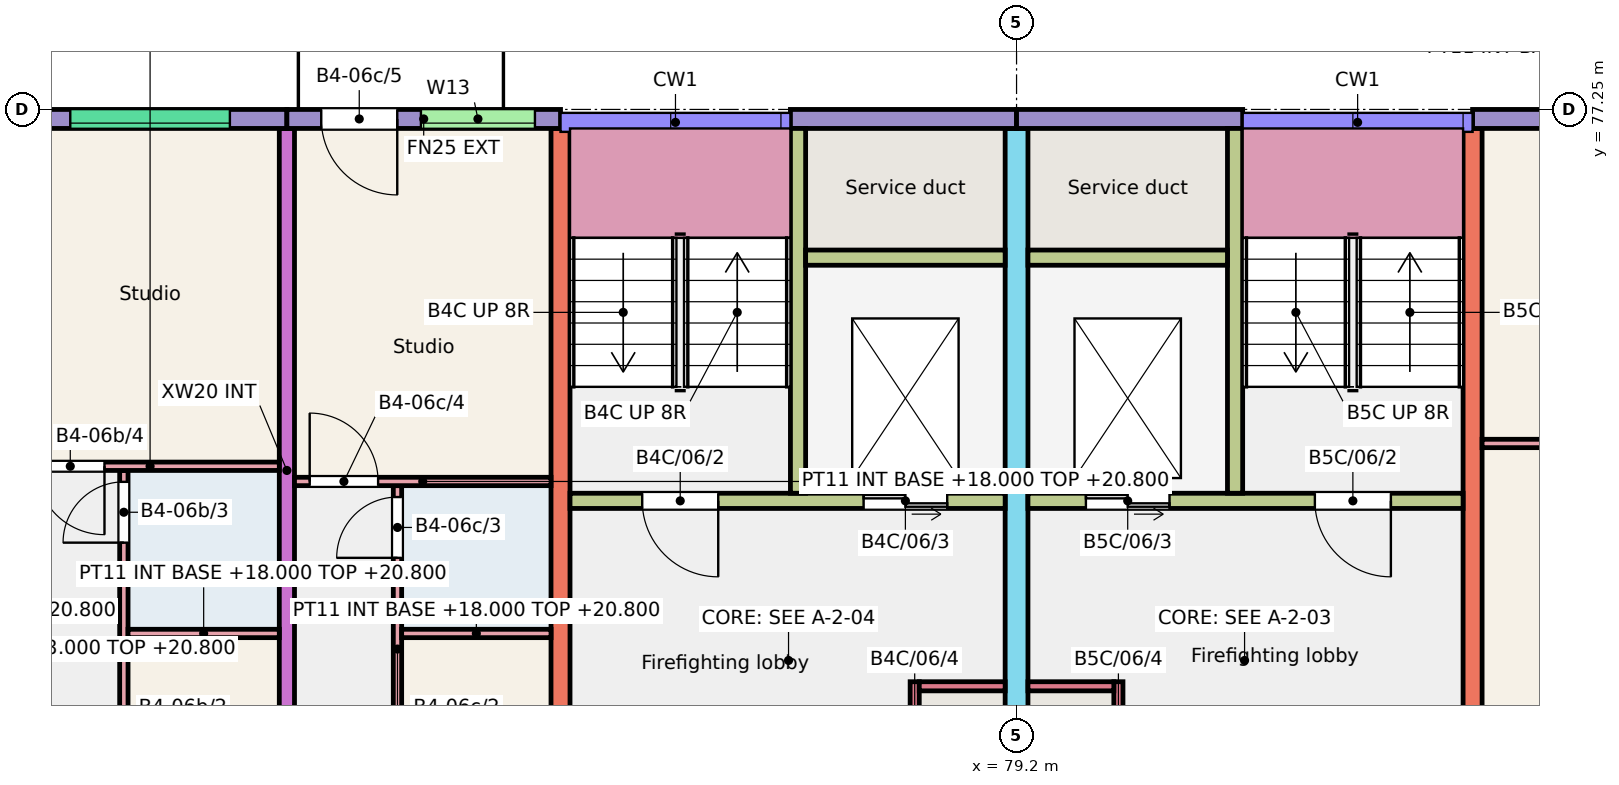
"""IFC4 building model, lengths in metres.
Left out: names, types, materials, properties, quantities, classifications, styles, units other than length and angle.
Written with IfcOpenShell. Run it as: python <this file> out.ifc"""

import sys

from ifc_helpers import new_model, si_unit, direction, frame, frame_2d, origin, place, context, subcontext, project, spatial, rectangle, extrude, element, fill, save


model = new_model("IFC4")
c1 = context("Model", 3, precision=1e-05, world=origin(), true_north=direction((0.0, 1.0)))
c2 = subcontext(c1, "Body", "Model", "MODEL_VIEW")
j1 = project(units=[si_unit("LENGTHUNIT", "METRE"), si_unit("PLANEANGLEUNIT", "RADIAN")], contexts=[c1])
p1 = place(None, origin())
s1 = spatial("IfcSite", under=j1, at=p1, CompositionType="ELEMENT")
p2 = place(p1, origin())
s2 = spatial("IfcBuilding", under=s1, at=p2, CompositionType="ELEMENT")
p3 = place(p2, frame((0.0, 0.0, 18.0)))
s3 = spatial("IfcBuildingStorey", under=s2, at=p3, CompositionType="ELEMENT", Elevation=18.0)
p4 = place(p3, frame((69.6, 68.0, 0.0), z_axis=(0.0, 0.0, 1.0), x_axis=(0.0, 1.0, 0.0)))
e1 = element("IfcWall", 1, at=p4, inside=s3, PredefinedType="SHEAR", context=c2, shape_type="SweptSolid", body=[
    extrude(rectangle(XDim=9.0, YDim=0.2, at=frame_2d((4.5, 0.0))), origin(), (0.0, 0.0, 1.0), 3.0),
])
p5 = place(p3, frame((73.2, 68.0, 0.0), z_axis=(0.0, 0.0, 1.0), x_axis=(0.0, 1.0, 0.0)))
e2 = element("IfcWall", 2, at=p5, inside=s3, PredefinedType="SHEAR", context=c2, shape_type="SweptSolid", body=[
    extrude(rectangle(XDim=9.0, YDim=0.25, at=frame_2d((4.5, 0.0))), origin(), (0.0, 0.0, 1.0), 3.0),
])
p6 = place(p3, frame((79.2, 66.0, 0.0), z_axis=(0.0, 0.0, 1.0), x_axis=(0.0, 1.0, 0.0)))
e3 = element("IfcWall", 3, at=p6, inside=s3, PredefinedType="SHEAR", context=c2, shape_type="SweptSolid", body=[
    extrude(rectangle(XDim=11.0, YDim=0.3, at=frame_2d((5.5, 0.0))), origin(), (0.0, 0.0, 1.0), 3.0),
])
p7 = place(p6, frame((0.3, 0.0, 0.0)))
e4 = element("IfcOpeningElement", 4, at=p7, cuts=e3, PredefinedType="OPENING", context=c2, shape_type="SweptSolid", body=[
    extrude(rectangle(XDim=1.2, YDim=2.1, at=frame_2d((0.6, 1.05))), frame((0.0, 0.16, 0.0), z_axis=(0.0, -1.0, 0.0), x_axis=(1.0, 0.0, 0.0)), (0.0, 0.0, 1.0), 0.32),
])
p8 = place(p3, frame((85.2, 68.0, 0.0), z_axis=(0.0, 0.0, 1.0), x_axis=(0.0, 1.0, 0.0)))
e5 = element("IfcWall", 5, at=p8, inside=s3, PredefinedType="SHEAR", context=c2, shape_type="SweptSolid", body=[
    extrude(rectangle(XDim=9.0, YDim=0.25, at=frame_2d((4.5, 0.0))), origin(), (0.0, 0.0, 1.0), 3.0),
])
p9 = place(p3, frame((66.0, 77.125, 0.0), z_axis=(0.0, 0.0, 1.0), x_axis=(1.0, 0.0, 0.0)))
e6 = element("IfcWall", 6, at=p9, inside=s3, PredefinedType="SOLIDWALL", context=c2, shape_type="SweptSolid", body=[
    extrude(rectangle(XDim=3.6, YDim=0.25, at=frame_2d((1.8, 0.0))), origin(), (0.0, 0.0, 1.0), 3.0),
])
p10 = place(p9, frame((0.75, 0.0, 1.2)))
e7 = element("IfcOpeningElement", 7, at=p10, cuts=e6, PredefinedType="OPENING", context=c2, shape_type="SweptSolid", body=[
    extrude(rectangle(XDim=2.1, YDim=1.2, at=frame_2d((1.05, 0.6))), frame((0.0, 0.135, 0.0), z_axis=(0.0, -1.0, 0.0), x_axis=(1.0, 0.0, 0.0)), (0.0, 0.0, 1.0), 0.27),
])
p11 = place(p3, frame((69.6, 77.125, 0.0), z_axis=(0.0, 0.0, 1.0), x_axis=(1.0, 0.0, 0.0)))
e8 = element("IfcWall", 8, at=p11, inside=s3, PredefinedType="SOLIDWALL", context=c2, shape_type="SweptSolid", body=[
    extrude(rectangle(XDim=3.6, YDim=0.25, at=frame_2d((1.8, 0.0))), origin(), (0.0, 0.0, 1.0), 3.0),
])
p12 = place(p11, frame((1.763, 0.0, 1.2)))
e9 = element("IfcOpeningElement", 9, at=p12, cuts=e8, PredefinedType="OPENING", context=c2, shape_type="SweptSolid", body=[
    extrude(rectangle(XDim=1.5, YDim=1.2, at=frame_2d((0.75, 0.6))), frame((0.0, 0.135, 0.0), z_axis=(0.0, -1.0, 0.0), x_axis=(1.0, 0.0, 0.0)), (0.0, 0.0, 1.0), 0.27),
])
p13 = place(p11, frame((0.452, 0.0, 0.0)))
e10 = element("IfcOpeningElement", 10, at=p13, cuts=e8, PredefinedType="OPENING", context=c2, shape_type="SweptSolid", body=[
    extrude(rectangle(XDim=1.0, YDim=2.1, at=frame_2d((0.5, 1.05))), frame((0.0, 0.135, 0.0), z_axis=(0.0, -1.0, 0.0), x_axis=(1.0, 0.0, 0.0)), (0.0, 0.0, 1.0), 0.27),
])
p14 = place(p3, frame((76.225, 77.125, 0.0), z_axis=(0.0, 0.0, 1.0), x_axis=(1.0, 0.0, 0.0)))
e11 = element("IfcWall", 11, at=p14, inside=s3, PredefinedType="SOLIDWALL", context=c2, shape_type="SweptSolid", body=[
    extrude(rectangle(XDim=2.975, YDim=0.25, at=frame_2d((1.487, 0.0))), origin(), (0.0, 0.0, 1.0), 3.0),
])
p15 = place(p3, frame((73.325, 72.1, 0.0), z_axis=(0.0, 0.0, 1.0), x_axis=(1.0, 0.0, 0.0)))
e12 = element("IfcWall", 12, at=p15, inside=s3, PredefinedType="SHEAR", context=c2, shape_type="SweptSolid", body=[
    extrude(rectangle(XDim=5.725, YDim=0.2, at=frame_2d((2.863, 0.0))), origin(), (0.0, 0.0, 1.0), 3.0),
])
p16 = place(p15, frame((0.95, 0.0, 0.0)))
e13 = element("IfcOpeningElement", 13, at=p16, cuts=e12, PredefinedType="OPENING", context=c2, shape_type="SweptSolid", body=[
    extrude(rectangle(XDim=1.0, YDim=2.1, at=frame_2d((0.5, 1.05))), frame((0.0, 0.11, 0.0), z_axis=(0.0, -1.0, 0.0), x_axis=(1.0, 0.0, 0.0)), (0.0, 0.0, 1.0), 0.22),
])
p17 = place(p15, frame((3.863, 0.0, 0.0)))
e14 = element("IfcOpeningElement", 14, at=p17, cuts=e12, PredefinedType="OPENING", context=c2, shape_type="SweptSolid", body=[
    extrude(rectangle(XDim=1.1, YDim=2.1, at=frame_2d((0.55, 1.05))), frame((0.0, 0.11, 0.0), z_axis=(0.0, -1.0, 0.0), x_axis=(1.0, 0.0, 0.0)), (0.0, 0.0, 1.0), 0.22),
])
p18 = place(p3, frame((76.325, 72.2, 0.0), z_axis=(0.0, 0.0, 1.0), x_axis=(0.0, 1.0, 0.0)))
e15 = element("IfcWall", 15, at=p18, inside=s3, PredefinedType="SHEAR", context=c2, shape_type="SweptSolid", body=[
    extrude(rectangle(XDim=4.8, YDim=0.2, at=frame_2d((2.4, 0.0))), origin(), (0.0, 0.0, 1.0), 3.0),
])
p19 = place(p3, frame((76.425, 75.3, 0.0), z_axis=(0.0, 0.0, 1.0), x_axis=(1.0, 0.0, 0.0)))
e16 = element("IfcWall", 16, at=p19, inside=s3, PredefinedType="SHEAR", context=c2, shape_type="SweptSolid", body=[
    extrude(rectangle(XDim=2.625, YDim=0.2, at=frame_2d((1.312, 0.0))), origin(), (0.0, 0.0, 1.0), 3.0),
])
p20 = place(p3, frame((77.86, 68.0, 0.0), z_axis=(0.0, 0.0, 1.0), x_axis=(0.0, 1.0, 0.0)))
e17 = element("IfcWall", 17, at=p20, inside=s3, PredefinedType="SHEAR", context=c2, shape_type="SweptSolid", body=[
    extrude(rectangle(XDim=1.72, YDim=0.12, at=frame_2d((0.86, 0.0))), origin(), (0.0, 0.0, 1.0), 3.0),
])
p21 = place(p20, frame((0.45, 0.0, 0.0)))
e18 = element("IfcOpeningElement", 18, at=p21, cuts=e17, PredefinedType="OPENING", context=c2, shape_type="SweptSolid", body=[
    extrude(rectangle(XDim=0.9, YDim=2.1, at=frame_2d((0.45, 1.05))), frame((0.0, 0.07, 0.0), z_axis=(0.0, -1.0, 0.0), x_axis=(1.0, 0.0, 0.0)), (0.0, 0.0, 1.0), 0.14),
])
p22 = place(p3, frame((77.92, 69.66, 0.0), z_axis=(0.0, 0.0, 1.0), x_axis=(1.0, 0.0, 0.0)))
e19 = element("IfcWall", 19, at=p22, inside=s3, PredefinedType="SHEAR", context=c2, shape_type="SweptSolid", body=[
    extrude(rectangle(XDim=1.13, YDim=0.12, at=frame_2d((0.565, 0.0))), origin(), (0.0, 0.0, 1.0), 3.0),
])
p23 = place(p3, frame((79.2, 77.125, 0.0), z_axis=(0.0, 0.0, 1.0), x_axis=(1.0, 0.0, 0.0)))
e20 = element("IfcWall", 20, at=p23, inside=s3, PredefinedType="SOLIDWALL", context=c2, shape_type="SweptSolid", body=[
    extrude(rectangle(XDim=2.975, YDim=0.25, at=frame_2d((1.488, 0.0))), origin(), (0.0, 0.0, 1.0), 3.0),
])
p24 = place(p3, frame((79.35, 72.1, 0.0), z_axis=(0.0, 0.0, 1.0), x_axis=(1.0, 0.0, 0.0)))
e21 = element("IfcWall", 21, at=p24, inside=s3, PredefinedType="SHEAR", context=c2, shape_type="SweptSolid", body=[
    extrude(rectangle(XDim=5.725, YDim=0.2, at=frame_2d((2.862, 0.0))), origin(), (0.0, 0.0, 1.0), 3.0),
])
p25 = place(p24, frame((3.775, 0.0, 0.0)))
e22 = element("IfcOpeningElement", 22, at=p25, cuts=e21, PredefinedType="OPENING", context=c2, shape_type="SweptSolid", body=[
    extrude(rectangle(XDim=1.0, YDim=2.1, at=frame_2d((0.5, 1.05))), frame((0.0, 0.11, 0.0), z_axis=(0.0, -1.0, 0.0), x_axis=(1.0, 0.0, 0.0)), (0.0, 0.0, 1.0), 0.22),
])
p26 = place(p24, frame((0.762, 0.0, 0.0)))
e23 = element("IfcOpeningElement", 23, at=p26, cuts=e21, PredefinedType="OPENING", context=c2, shape_type="SweptSolid", body=[
    extrude(rectangle(XDim=1.1, YDim=2.1, at=frame_2d((0.55, 1.05))), frame((0.0, 0.11, 0.0), z_axis=(0.0, -1.0, 0.0), x_axis=(1.0, 0.0, 0.0)), (0.0, 0.0, 1.0), 0.22),
])
p27 = place(p3, frame((82.075, 72.2, 0.0), z_axis=(0.0, 0.0, 1.0), x_axis=(0.0, 1.0, 0.0)))
e24 = element("IfcWall", 24, at=p27, inside=s3, PredefinedType="SHEAR", context=c2, shape_type="SweptSolid", body=[
    extrude(rectangle(XDim=4.8, YDim=0.2, at=frame_2d((2.4, 0.0))), origin(), (0.0, 0.0, 1.0), 3.0),
])
p28 = place(p3, frame((79.35, 75.3, 0.0), z_axis=(0.0, 0.0, 1.0), x_axis=(1.0, 0.0, 0.0)))
e25 = element("IfcWall", 25, at=p28, inside=s3, PredefinedType="SHEAR", context=c2, shape_type="SweptSolid", body=[
    extrude(rectangle(XDim=2.625, YDim=0.2, at=frame_2d((1.312, 0.0))), origin(), (0.0, 0.0, 1.0), 3.0),
])
p29 = place(p3, frame((80.54, 68.0, 0.0), z_axis=(0.0, 0.0, 1.0), x_axis=(0.0, 1.0, 0.0)))
e26 = element("IfcWall", 26, at=p29, inside=s3, PredefinedType="SHEAR", context=c2, shape_type="SweptSolid", body=[
    extrude(rectangle(XDim=1.72, YDim=0.12, at=frame_2d((0.86, 0.0))), origin(), (0.0, 0.0, 1.0), 3.0),
])
p30 = place(p29, frame((0.45, 0.0, 0.0)))
e27 = element("IfcOpeningElement", 27, at=p30, cuts=e26, PredefinedType="OPENING", context=c2, shape_type="SweptSolid", body=[
    extrude(rectangle(XDim=0.9, YDim=2.1, at=frame_2d((0.45, 1.05))), frame((0.0, 0.07, 0.0), z_axis=(0.0, -1.0, 0.0), x_axis=(1.0, 0.0, 0.0)), (0.0, 0.0, 1.0), 0.14),
])
p31 = place(p3, frame((79.35, 69.66, 0.0), z_axis=(0.0, 0.0, 1.0), x_axis=(1.0, 0.0, 0.0)))
e28 = element("IfcWall", 28, at=p31, inside=s3, PredefinedType="SHEAR", context=c2, shape_type="SweptSolid", body=[
    extrude(rectangle(XDim=1.13, YDim=0.12, at=frame_2d((0.565, 0.0))), origin(), (0.0, 0.0, 1.0), 3.0),
])
p32 = place(p3, frame((85.2, 77.125, 0.0), z_axis=(0.0, 0.0, 1.0), x_axis=(1.0, 0.0, 0.0)))
e29 = element("IfcWall", 29, at=p32, inside=s3, PredefinedType="SOLIDWALL", context=c2, shape_type="SweptSolid", body=[
    extrude(rectangle(XDim=3.6, YDim=0.25, at=frame_2d((1.8, 0.0))), origin(), (0.0, 0.0, 1.0), 3.0),
])
p33 = place(p32, frame((1.212, 0.0, 1.1)))
e30 = element("IfcOpeningElement", 30, at=p33, cuts=e29, PredefinedType="OPENING", context=c2, shape_type="SweptSolid", body=[
    extrude(rectangle(XDim=1.2, YDim=1.3, at=frame_2d((0.6, 0.65))), frame((0.0, 0.135, 0.0), z_axis=(0.0, -1.0, 0.0), x_axis=(1.0, 0.0, 0.0)), (0.0, 0.0, 1.0), 0.27),
])
p34 = place(p3, frame((67.455, 68.0, 0.0), z_axis=(0.0, 0.0, 1.0), x_axis=(0.0, 1.0, 0.0)))
e31 = element("IfcWall", 31, at=p34, inside=s3, PredefinedType="PARTITIONING", context=c2, shape_type="SweptSolid", body=[
    extrude(rectangle(XDim=4.5, YDim=0.11, at=frame_2d((2.25, 0.0))), origin(), (0.0, 0.0, 1.0), 2.8),
])
p35 = place(p34, frame((0.2, 0.0, 0.0)))
e32 = element("IfcOpeningElement", 32, at=p35, cuts=e31, PredefinedType="OPENING", context=c2, shape_type="SweptSolid", body=[
    extrude(rectangle(XDim=0.8, YDim=2.1, at=frame_2d((0.4, 1.05))), frame((0.0, 0.065, 0.0), z_axis=(0.0, -1.0, 0.0), x_axis=(1.0, 0.0, 0.0)), (0.0, 0.0, 1.0), 0.13),
])
p36 = place(p34, frame((3.55, 0.0, 0.0)))
e33 = element("IfcOpeningElement", 33, at=p36, cuts=e31, PredefinedType="OPENING", context=c2, shape_type="SweptSolid", body=[
    extrude(rectangle(XDim=0.8, YDim=2.1, at=frame_2d((0.4, 1.05))), frame((0.0, 0.065, 0.0), z_axis=(0.0, -1.0, 0.0), x_axis=(1.0, 0.0, 0.0)), (0.0, 0.0, 1.0), 0.13),
])
p37 = place(p3, frame((67.51, 70.355, 0.0), z_axis=(0.0, 0.0, 1.0), x_axis=(1.0, 0.0, 0.0)))
e34 = element("IfcWall", 34, at=p37, inside=s3, PredefinedType="PARTITIONING", context=c2, shape_type="SweptSolid", body=[
    extrude(rectangle(XDim=1.99, YDim=0.11, at=frame_2d((0.995, 0.0))), origin(), (0.0, 0.0, 1.0), 2.8),
])
p38 = place(p3, frame((66.1, 72.555, 0.0), z_axis=(0.0, 0.0, 1.0), x_axis=(1.0, 0.0, 0.0)))
e35 = element("IfcWall", 35, at=p38, inside=s3, PredefinedType="PARTITIONING", context=c2, shape_type="SweptSolid", body=[
    extrude(rectangle(XDim=3.4, YDim=0.11, at=frame_2d((1.7, 0.0))), origin(), (0.0, 0.0, 1.0), 2.8),
])
p39 = place(p38, frame((0.2, 0.0, 0.0)))
e36 = element("IfcOpeningElement", 36, at=p39, cuts=e35, PredefinedType="OPENING", context=c2, shape_type="SweptSolid", body=[
    extrude(rectangle(XDim=0.9, YDim=2.1, at=frame_2d((0.45, 1.05))), frame((0.0, 0.065, 0.0), z_axis=(0.0, -1.0, 0.0), x_axis=(1.0, 0.0, 0.0)), (0.0, 0.0, 1.0), 0.13),
])
p40 = place(p3, frame((71.055, 68.0, 0.0), z_axis=(0.0, 0.0, 1.0), x_axis=(0.0, 1.0, 0.0)))
e37 = element("IfcWall", 37, at=p40, inside=s3, PredefinedType="PARTITIONING", context=c2, shape_type="SweptSolid", body=[
    extrude(rectangle(XDim=4.3, YDim=0.11, at=frame_2d((2.15, 0.0))), origin(), (0.0, 0.0, 1.0), 2.8),
])
p41 = place(p40, frame((0.2, 0.0, 0.0)))
e38 = element("IfcOpeningElement", 38, at=p41, cuts=e37, PredefinedType="OPENING", context=c2, shape_type="SweptSolid", body=[
    extrude(rectangle(XDim=0.8, YDim=2.1, at=frame_2d((0.4, 1.05))), frame((0.0, 0.065, 0.0), z_axis=(0.0, -1.0, 0.0), x_axis=(1.0, 0.0, 0.0)), (0.0, 0.0, 1.0), 0.13),
])
p42 = place(p40, frame((3.35, 0.0, 0.0)))
e39 = element("IfcOpeningElement", 39, at=p42, cuts=e37, PredefinedType="OPENING", context=c2, shape_type="SweptSolid", body=[
    extrude(rectangle(XDim=0.8, YDim=2.1, at=frame_2d((0.4, 1.05))), frame((0.0, 0.065, 0.0), z_axis=(0.0, -1.0, 0.0), x_axis=(1.0, 0.0, 0.0)), (0.0, 0.0, 1.0), 0.13),
])
p43 = place(p3, frame((71.11, 70.355, 0.0), z_axis=(0.0, 0.0, 1.0), x_axis=(1.0, 0.0, 0.0)))
e40 = element("IfcWall", 40, at=p43, inside=s3, PredefinedType="PARTITIONING", context=c2, shape_type="SweptSolid", body=[
    extrude(rectangle(XDim=1.965, YDim=0.11, at=frame_2d((0.982, 0.0))), origin(), (0.0, 0.0, 1.0), 2.8),
])
p44 = place(p3, frame((69.7, 72.355, 0.0), z_axis=(0.0, 0.0, 1.0), x_axis=(1.0, 0.0, 0.0)))
e41 = element("IfcWall", 41, at=p44, inside=s3, PredefinedType="PARTITIONING", context=c2, shape_type="SweptSolid", body=[
    extrude(rectangle(XDim=3.375, YDim=0.11, at=frame_2d((1.688, 0.0))), origin(), (0.0, 0.0, 1.0), 2.8),
])
p45 = place(p44, frame((0.2, 0.0, 0.0)))
e42 = element("IfcOpeningElement", 42, at=p45, cuts=e41, PredefinedType="OPENING", context=c2, shape_type="SweptSolid", body=[
    extrude(rectangle(XDim=0.9, YDim=2.1, at=frame_2d((0.45, 1.05))), frame((0.0, 0.065, 0.0), z_axis=(0.0, -1.0, 0.0), x_axis=(1.0, 0.0, 0.0)), (0.0, 0.0, 1.0), 0.13),
])
p46 = place(p3, frame((85.325, 72.855, 0.0), z_axis=(0.0, 0.0, 1.0), x_axis=(1.0, 0.0, 0.0)))
e43 = element("IfcWall", 43, at=p46, inside=s3, PredefinedType="PARTITIONING", context=c2, shape_type="SweptSolid", body=[
    extrude(rectangle(XDim=3.375, YDim=0.11, at=frame_2d((1.688, 0.0))), origin(), (0.0, 0.0, 1.0), 2.8),
])
p47 = place(p10, origin())
e44 = element("IfcWindow", 44, at=p47, inside=s3, PartitioningType="SINGLE_PANEL", PredefinedType="WINDOW", context=c2, shape_type="SweptSolid", body=[
    extrude(rectangle(XDim=2.1, YDim=1.2, at=frame_2d((1.05, 0.6))), frame((0.0, -0.025, 0.0), z_axis=(0.0, -1.0, 0.0), x_axis=(1.0, 0.0, 0.0)), (0.0, 0.0, 1.0), 0.06),
])
fill(e7, e44)
p48 = place(p12, origin())
e45 = element("IfcWindow", 45, at=p48, inside=s3, PartitioningType="SINGLE_PANEL", PredefinedType="WINDOW", context=c2, shape_type="SweptSolid", body=[
    extrude(rectangle(XDim=1.5, YDim=1.2, at=frame_2d((0.75, 0.6))), frame((0.0, -0.025, 0.0), z_axis=(0.0, -1.0, 0.0), x_axis=(1.0, 0.0, 0.0)), (0.0, 0.0, 1.0), 0.06),
])
fill(e9, e45)
p49 = place(p36, origin())
e46 = element("IfcDoor", 46, at=p49, inside=s3, OperationType="SINGLE_SWING_LEFT", PredefinedType="DOOR", context=c2, shape_type="SweptSolid", body=[
    extrude(rectangle(XDim=0.8, YDim=2.1, at=frame_2d((0.4, 1.05))), frame((0.0, 0.025, 0.0), z_axis=(0.0, -1.0, 0.0), x_axis=(1.0, 0.0, 0.0)), (0.0, 0.0, 1.0), 0.05),
])
fill(e33, e46)
p50 = place(p39, origin())
e47 = element("IfcDoor", 47, at=p50, inside=s3, OperationType="SINGLE_SWING_RIGHT", PredefinedType="DOOR", context=c2, shape_type="SweptSolid", body=[
    extrude(rectangle(XDim=0.9, YDim=2.1, at=frame_2d((0.45, 1.05))), frame((0.0, 0.025, 0.0), z_axis=(0.0, -1.0, 0.0), x_axis=(1.0, 0.0, 0.0)), (0.0, 0.0, 1.0), 0.05),
])
fill(e36, e47)
p51 = place(p42, origin())
e48 = element("IfcDoor", 48, at=p51, inside=s3, OperationType="SINGLE_SWING_LEFT", PredefinedType="DOOR", context=c2, shape_type="SweptSolid", body=[
    extrude(rectangle(XDim=0.8, YDim=2.1, at=frame_2d((0.4, 1.05))), frame((0.0, 0.025, 0.0), z_axis=(0.0, -1.0, 0.0), x_axis=(1.0, 0.0, 0.0)), (0.0, 0.0, 1.0), 0.05),
])
fill(e39, e48)
p52 = place(p45, origin())
e49 = element("IfcDoor", 49, at=p52, inside=s3, OperationType="SINGLE_SWING_LEFT", PredefinedType="DOOR", context=c2, shape_type="SweptSolid", body=[
    extrude(rectangle(XDim=0.9, YDim=2.1, at=frame_2d((0.45, 1.05))), frame((0.0, 0.025, 0.0), z_axis=(0.0, -1.0, 0.0), x_axis=(1.0, 0.0, 0.0)), (0.0, 0.0, 1.0), 0.05),
])
fill(e42, e49)
p53 = place(p13, origin())
e50 = element("IfcDoor", 50, at=p53, inside=s3, OperationType="SINGLE_SWING_RIGHT", PredefinedType="DOOR", context=c2, shape_type="SweptSolid", body=[
    extrude(rectangle(XDim=1.0, YDim=2.1, at=frame_2d((0.5, 1.05))), frame((0.0, 0.025, 0.0), z_axis=(0.0, -1.0, 0.0), x_axis=(1.0, 0.0, 0.0)), (0.0, 0.0, 1.0), 0.05),
])
fill(e10, e50)
p54 = place(p16, origin())
e51 = element("IfcDoor", 51, at=p54, inside=s3, OperationType="SINGLE_SWING_RIGHT", PredefinedType="DOOR", context=c2, shape_type="SweptSolid", body=[
    extrude(rectangle(XDim=1.0, YDim=2.1, at=frame_2d((0.5, 1.05))), frame((0.0, 0.025, 0.0), z_axis=(0.0, -1.0, 0.0), x_axis=(1.0, 0.0, 0.0)), (0.0, 0.0, 1.0), 0.05),
])
fill(e13, e51)
p55 = place(p17, origin())
e52 = element("IfcDoor", 52, at=p55, inside=s3, OperationType="DOUBLE_DOOR_SLIDING", PredefinedType="DOOR", context=c2, shape_type="SweptSolid", body=[
    extrude(rectangle(XDim=1.1, YDim=2.1, at=frame_2d((0.55, 1.05))), frame((0.0, 0.025, 0.0), z_axis=(0.0, -1.0, 0.0), x_axis=(1.0, 0.0, 0.0)), (0.0, 0.0, 1.0), 0.05),
])
fill(e14, e52)
p56 = place(p25, origin())
e53 = element("IfcDoor", 53, at=p56, inside=s3, OperationType="SINGLE_SWING_RIGHT", PredefinedType="DOOR", context=c2, shape_type="SweptSolid", body=[
    extrude(rectangle(XDim=1.0, YDim=2.1, at=frame_2d((0.5, 1.05))), frame((0.0, 0.025, 0.0), z_axis=(0.0, -1.0, 0.0), x_axis=(1.0, 0.0, 0.0)), (0.0, 0.0, 1.0), 0.05),
])
fill(e22, e53)
p57 = place(p26, origin())
e54 = element("IfcDoor", 54, at=p57, inside=s3, OperationType="DOUBLE_DOOR_SLIDING", PredefinedType="DOOR", context=c2, shape_type="SweptSolid", body=[
    extrude(rectangle(XDim=1.1, YDim=2.1, at=frame_2d((0.55, 1.05))), frame((0.0, 0.025, 0.0), z_axis=(0.0, -1.0, 0.0), x_axis=(1.0, 0.0, 0.0)), (0.0, 0.0, 1.0), 0.05),
])
fill(e23, e54)
save(model, sys.argv[1])
